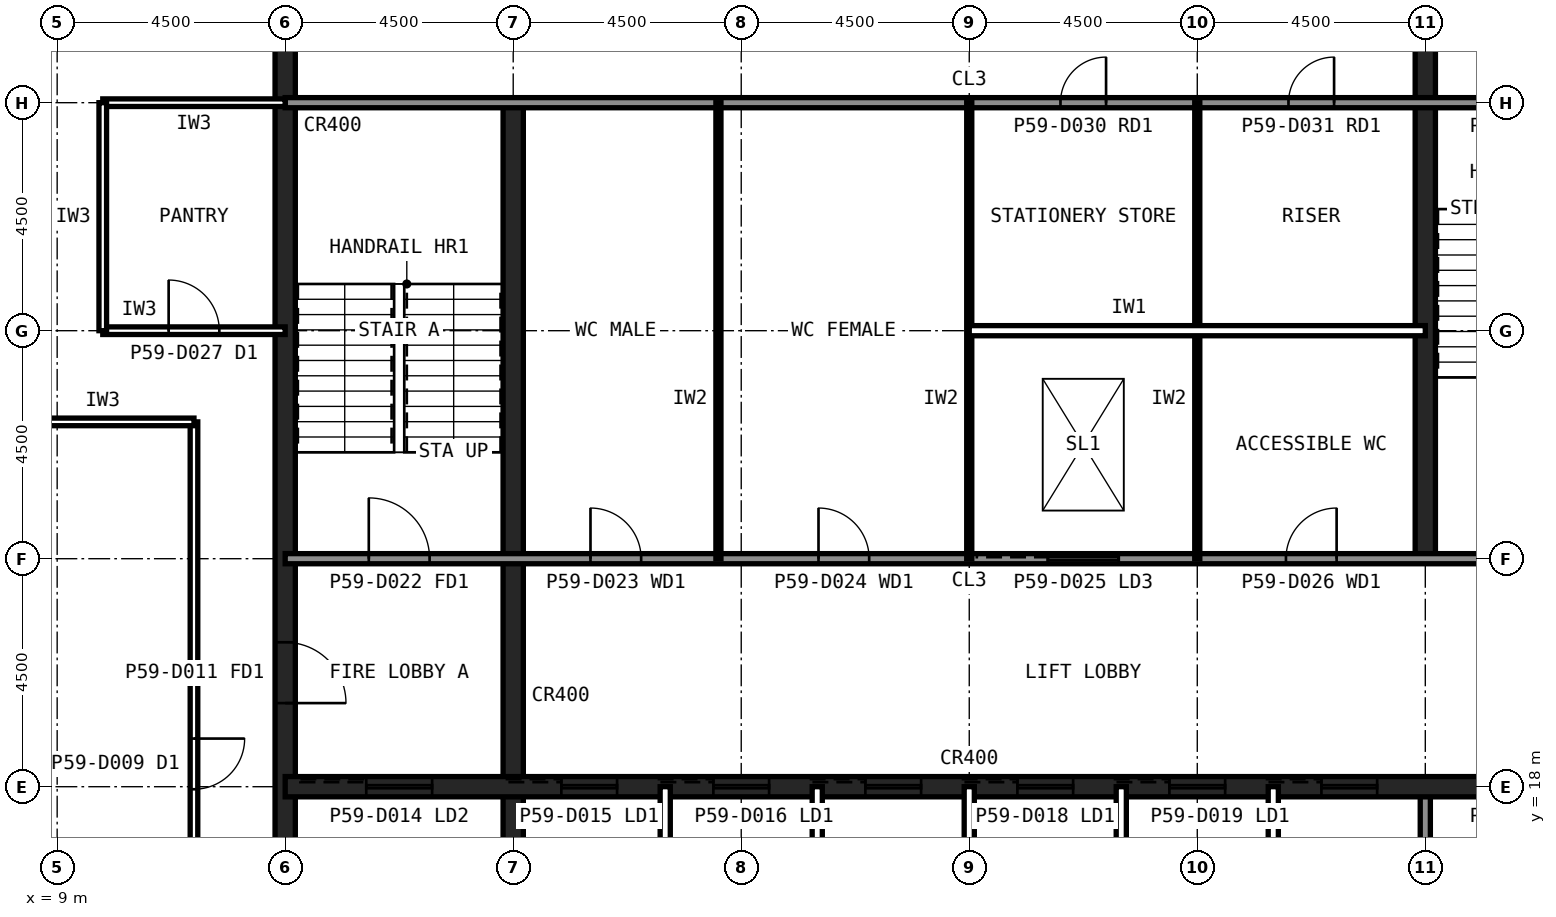
"""IFC4 building model, lengths in metres.
Left out: names, types, materials, properties, quantities, classifications, styles, units other than length and angle.
Written with IfcOpenShell. Run it as: python <this file> out.ifc"""

import sys

from ifc_helpers import new_model, si_unit, direction, frame, frame_2d, origin, place, context, subcontext, project, spatial, rectangle, extrude, element, fill, save


model = new_model("IFC4")
c1 = context("Model", 3, precision=1e-05, world=origin(), true_north=direction((0.0, 1.0)))
c2 = subcontext(c1, "Body", "Model", "MODEL_VIEW")
j1 = project(units=[si_unit("LENGTHUNIT", "METRE"), si_unit("PLANEANGLEUNIT", "RADIAN")], contexts=[c1])
p1 = place(None, origin())
s1 = spatial("IfcSite", under=j1, at=p1, CompositionType="ELEMENT")
p2 = place(p1, origin())
s2 = spatial("IfcBuilding", under=s1, at=p2, CompositionType="ELEMENT")
p3 = place(p2, frame((0.0, 0.0, 246.6)))
s3 = spatial("IfcBuildingStorey", under=s2, at=p3, CompositionType="ELEMENT", Elevation=246.6)
p4 = place(p3, frame((13.5, 40.5, 0.0), z_axis=(0.0, 0.0, 1.0), x_axis=(0.0, -1.0, 0.0)))
e1 = element("IfcWall", 1, at=p4, inside=s3, PredefinedType="SHEAR", context=c2, shape_type="SweptSolid", body=[
    extrude(rectangle(XDim=27.0, YDim=0.4, at=frame_2d((13.5, 0.0))), origin(), (0.0, 0.0, 1.0), 4.0),
])
p5 = place(p4, frame((19.65, 0.0, 0.0)))
e2 = element("IfcOpeningElement", 2, at=p5, cuts=e1, PredefinedType="OPENING", context=c2, shape_type="SweptSolid", body=[
    extrude(rectangle(XDim=1.2, YDim=2.1, at=frame_2d((0.6, 1.05))), frame((0.0, 0.21, 0.0), z_axis=(0.0, -1.0, 0.0), x_axis=(1.0, 0.0, 0.0)), (0.0, 0.0, 1.0), 0.42),
])
p6 = place(p4, frame((5.85, 0.0, 0.0)))
e3 = element("IfcOpeningElement", 3, at=p6, cuts=e1, PredefinedType="OPENING", context=c2, shape_type="SweptSolid", body=[
    extrude(rectangle(XDim=1.8, YDim=2.1, at=frame_2d((0.9, 1.05))), frame((0.0, 0.21, 0.0), z_axis=(0.0, -1.0, 0.0), x_axis=(1.0, 0.0, 0.0)), (0.0, 0.0, 1.0), 0.42),
])
p7 = place(p3, frame((18.0, 13.5, 0.0), z_axis=(0.0, 0.0, 1.0), x_axis=(0.0, 1.0, 0.0)))
e4 = element("IfcWall", 4, at=p7, inside=s3, PredefinedType="SHEAR", context=c2, shape_type="SweptSolid", body=[
    extrude(rectangle(XDim=18.0, YDim=0.4, at=frame_2d((9.0, 0.0))), origin(), (0.0, 0.0, 1.0), 4.0),
])
p8 = place(p3, frame((36.0, 13.5, 0.0), z_axis=(0.0, 0.0, 1.0), x_axis=(0.0, 1.0, 0.0)))
e5 = element("IfcWall", 5, at=p8, inside=s3, PredefinedType="SOLIDWALL", context=c2, shape_type="SweptSolid", body=[
    extrude(rectangle(XDim=4.5, YDim=0.2, at=frame_2d((2.25, 0.0))), origin(), (0.0, 0.0, 1.0), 3.84),
])
p9 = place(p3, frame((36.0, 22.5, 0.0), z_axis=(0.0, 0.0, 1.0), x_axis=(0.0, 1.0, 0.0)))
e6 = element("IfcWall", 6, at=p9, inside=s3, PredefinedType="SHEAR", context=c2, shape_type="SweptSolid", body=[
    extrude(rectangle(XDim=18.0, YDim=0.4, at=frame_2d((9.0, 0.0))), origin(), (0.0, 0.0, 1.0), 4.0),
])
p10 = place(p3, frame((13.5, 18.0, 0.0), z_axis=(0.0, 0.0, 1.0), x_axis=(1.0, 0.0, 0.0)))
e7 = element("IfcWall", 7, at=p10, inside=s3, PredefinedType="SHEAR", context=c2, shape_type="SweptSolid", body=[
    extrude(rectangle(XDim=27.0, YDim=0.4, at=frame_2d((13.5, 0.0))), origin(), (0.0, 0.0, 1.0), 4.0),
])
p11 = place(p10, frame((24.3, 0.0, 0.0)))
e8 = element("IfcOpeningElement", 8, at=p11, cuts=e7, PredefinedType="OPENING", context=c2, shape_type="SweptSolid", body=[
    extrude(rectangle(XDim=0.9, YDim=2.1, at=frame_2d((0.45, 1.05))), frame((0.0, 0.21, 0.0), z_axis=(0.0, -1.0, 0.0), x_axis=(1.0, 0.0, 0.0)), (0.0, 0.0, 1.0), 0.42),
])
p12 = place(p10, frame((5.45, 0.0, 0.0)))
e9 = element("IfcOpeningElement", 9, at=p12, cuts=e7, PredefinedType="OPENING", context=c2, shape_type="SweptSolid", body=[
    extrude(rectangle(XDim=1.1, YDim=2.1, at=frame_2d((0.55, 1.05))), frame((0.0, 0.21, 0.0), z_axis=(0.0, -1.0, 0.0), x_axis=(1.0, 0.0, 0.0)), (0.0, 0.0, 1.0), 0.42),
])
p13 = place(p10, frame((8.45, 0.0, 0.0)))
e10 = element("IfcOpeningElement", 10, at=p13, cuts=e7, PredefinedType="OPENING", context=c2, shape_type="SweptSolid", body=[
    extrude(rectangle(XDim=1.1, YDim=2.1, at=frame_2d((0.55, 1.05))), frame((0.0, 0.21, 0.0), z_axis=(0.0, -1.0, 0.0), x_axis=(1.0, 0.0, 0.0)), (0.0, 0.0, 1.0), 0.42),
])
p14 = place(p10, frame((11.45, 0.0, 0.0)))
e11 = element("IfcOpeningElement", 11, at=p14, cuts=e7, PredefinedType="OPENING", context=c2, shape_type="SweptSolid", body=[
    extrude(rectangle(XDim=1.1, YDim=2.1, at=frame_2d((0.55, 1.05))), frame((0.0, 0.21, 0.0), z_axis=(0.0, -1.0, 0.0), x_axis=(1.0, 0.0, 0.0)), (0.0, 0.0, 1.0), 0.42),
])
p15 = place(p10, frame((14.45, 0.0, 0.0)))
e12 = element("IfcOpeningElement", 12, at=p15, cuts=e7, PredefinedType="OPENING", context=c2, shape_type="SweptSolid", body=[
    extrude(rectangle(XDim=1.1, YDim=2.1, at=frame_2d((0.55, 1.05))), frame((0.0, 0.21, 0.0), z_axis=(0.0, -1.0, 0.0), x_axis=(1.0, 0.0, 0.0)), (0.0, 0.0, 1.0), 0.42),
])
p16 = place(p10, frame((17.45, 0.0, 0.0)))
e13 = element("IfcOpeningElement", 13, at=p16, cuts=e7, PredefinedType="OPENING", context=c2, shape_type="SweptSolid", body=[
    extrude(rectangle(XDim=1.1, YDim=2.1, at=frame_2d((0.55, 1.05))), frame((0.0, 0.21, 0.0), z_axis=(0.0, -1.0, 0.0), x_axis=(1.0, 0.0, 0.0)), (0.0, 0.0, 1.0), 0.42),
])
p17 = place(p10, frame((20.45, 0.0, 0.0)))
e14 = element("IfcOpeningElement", 14, at=p17, cuts=e7, PredefinedType="OPENING", context=c2, shape_type="SweptSolid", body=[
    extrude(rectangle(XDim=1.1, YDim=2.1, at=frame_2d((0.55, 1.05))), frame((0.0, 0.21, 0.0), z_axis=(0.0, -1.0, 0.0), x_axis=(1.0, 0.0, 0.0)), (0.0, 0.0, 1.0), 0.42),
])
p18 = place(p10, frame((1.6, 0.0, 0.0)))
e15 = element("IfcOpeningElement", 15, at=p18, cuts=e7, PredefinedType="OPENING", context=c2, shape_type="SweptSolid", body=[
    extrude(rectangle(XDim=1.3, YDim=2.2, at=frame_2d((0.65, 1.1))), frame((0.0, 0.21, 0.0), z_axis=(0.0, -1.0, 0.0), x_axis=(1.0, 0.0, 0.0)), (0.0, 0.0, 1.0), 0.42),
])
p19 = place(p3, frame((13.5, 22.5, 0.0), z_axis=(0.0, 0.0, 1.0), x_axis=(1.0, 0.0, 0.0)))
e16 = element("IfcWall", 16, at=p19, inside=s3, PredefinedType="SOLIDWALL", context=c2, shape_type="SweptSolid", body=[
    extrude(rectangle(XDim=27.0, YDim=0.2, at=frame_2d((13.5, 0.0))), origin(), (0.0, 0.0, 1.0), 3.84),
])
p20 = place(p19, frame((1.65, 0.0, 0.0)))
e17 = element("IfcOpeningElement", 17, at=p20, cuts=e16, PredefinedType="OPENING", context=c2, shape_type="SweptSolid", body=[
    extrude(rectangle(XDim=1.2, YDim=2.1, at=frame_2d((0.6, 1.05))), frame((0.0, 0.11, 0.0), z_axis=(0.0, -1.0, 0.0), x_axis=(1.0, 0.0, 0.0)), (0.0, 0.0, 1.0), 0.22),
])
p21 = place(p19, frame((6.025, 0.0, 0.0)))
e18 = element("IfcOpeningElement", 18, at=p21, cuts=e16, PredefinedType="OPENING", context=c2, shape_type="SweptSolid", body=[
    extrude(rectangle(XDim=1.0, YDim=2.1, at=frame_2d((0.5, 1.05))), frame((0.0, 0.11, 0.0), z_axis=(0.0, -1.0, 0.0), x_axis=(1.0, 0.0, 0.0)), (0.0, 0.0, 1.0), 0.22),
])
p22 = place(p19, frame((10.525, 0.0, 0.0)))
e19 = element("IfcOpeningElement", 19, at=p22, cuts=e16, PredefinedType="OPENING", context=c2, shape_type="SweptSolid", body=[
    extrude(rectangle(XDim=1.0, YDim=2.1, at=frame_2d((0.5, 1.05))), frame((0.0, 0.11, 0.0), z_axis=(0.0, -1.0, 0.0), x_axis=(1.0, 0.0, 0.0)), (0.0, 0.0, 1.0), 0.22),
])
p23 = place(p19, frame((19.75, 0.0, 0.0)))
e20 = element("IfcOpeningElement", 20, at=p23, cuts=e16, PredefinedType="OPENING", context=c2, shape_type="SweptSolid", body=[
    extrude(rectangle(XDim=1.0, YDim=2.1, at=frame_2d((0.5, 1.05))), frame((0.0, 0.11, 0.0), z_axis=(0.0, -1.0, 0.0), x_axis=(1.0, 0.0, 0.0)), (0.0, 0.0, 1.0), 0.22),
])
p24 = place(p19, frame((15.05, 0.0, 0.0)))
e21 = element("IfcOpeningElement", 21, at=p24, cuts=e16, PredefinedType="OPENING", context=c2, shape_type="SweptSolid", body=[
    extrude(rectangle(XDim=1.4, YDim=2.4, at=frame_2d((0.7, 1.2))), frame((0.0, 0.11, 0.0), z_axis=(0.0, -1.0, 0.0), x_axis=(1.0, 0.0, 0.0)), (0.0, 0.0, 1.0), 0.22),
])
p25 = place(p3, frame((13.5, 31.5, 0.0), z_axis=(0.0, 0.0, 1.0), x_axis=(1.0, 0.0, 0.0)))
e22 = element("IfcWall", 22, at=p25, inside=s3, PredefinedType="SOLIDWALL", context=c2, shape_type="SweptSolid", body=[
    extrude(rectangle(XDim=27.0, YDim=0.2, at=frame_2d((13.5, 0.0))), origin(), (0.0, 0.0, 1.0), 3.84),
])
p26 = place(p25, frame((24.15, 0.0, 0.0)))
e23 = element("IfcOpeningElement", 23, at=p26, cuts=e22, PredefinedType="OPENING", context=c2, shape_type="SweptSolid", body=[
    extrude(rectangle(XDim=1.2, YDim=2.1, at=frame_2d((0.6, 1.05))), frame((0.0, 0.11, 0.0), z_axis=(0.0, -1.0, 0.0), x_axis=(1.0, 0.0, 0.0)), (0.0, 0.0, 1.0), 0.22),
])
p27 = place(p25, frame((15.3, 0.0, 0.0)))
e24 = element("IfcOpeningElement", 24, at=p27, cuts=e22, PredefinedType="OPENING", context=c2, shape_type="SweptSolid", body=[
    extrude(rectangle(XDim=0.9, YDim=2.1, at=frame_2d((0.45, 1.05))), frame((0.0, 0.11, 0.0), z_axis=(0.0, -1.0, 0.0), x_axis=(1.0, 0.0, 0.0)), (0.0, 0.0, 1.0), 0.22),
])
p28 = place(p25, frame((19.8, 0.0, 0.0)))
e25 = element("IfcOpeningElement", 25, at=p28, cuts=e22, PredefinedType="OPENING", context=c2, shape_type="SweptSolid", body=[
    extrude(rectangle(XDim=0.9, YDim=2.1, at=frame_2d((0.45, 1.05))), frame((0.0, 0.11, 0.0), z_axis=(0.0, -1.0, 0.0), x_axis=(1.0, 0.0, 0.0)), (0.0, 0.0, 1.0), 0.22),
])
for number, where, z_axis, x_axis in (
    (26, (21.0, 13.5, 0.0), (0.0, 0.0, 1.0), (0.0, 1.0, 0.0)),
    (27, (24.0, 13.5, 0.0), (0.0, 0.0, 1.0), (0.0, 1.0, 0.0)),
    (28, (27.0, 13.5, 0.0), (0.0, 0.0, 1.0), (0.0, 1.0, 0.0)),
    (29, (30.0, 13.5, 0.0), (0.0, 0.0, 1.0), (0.0, 1.0, 0.0)),
    (30, (33.0, 13.5, 0.0), (0.0, 0.0, 1.0), (0.0, 1.0, 0.0)),
):
    element("IfcWall", number, at=place(p3, frame(where, z_axis=z_axis, x_axis=x_axis)), inside=s3, PredefinedType="PARTITIONING", context=c2, shape_type="SweptSolid", body=[
        extrude(rectangle(XDim=4.5, YDim=0.2, at=frame_2d((2.25, 0.0))), origin(), (0.0, 0.0, 1.0), 3.84),
    ])
for number, where, z_axis, x_axis in (
    (31, (22.05, 22.5, 0.0), (0.0, 0.0, 1.0), (0.0, 1.0, 0.0)),
    (32, (27.0, 22.5, 0.0), (0.0, 0.0, 1.0), (0.0, 1.0, 0.0)),
    (33, (31.5, 22.5, 0.0), (0.0, 0.0, 1.0), (0.0, 1.0, 0.0)),
):
    element("IfcWall", number, at=place(p3, frame(where, z_axis=z_axis, x_axis=x_axis)), inside=s3, PredefinedType="PLUMBINGWALL", context=c2, shape_type="SweptSolid", body=[
        extrude(rectangle(XDim=9.0, YDim=0.1, at=frame_2d((4.5, 0.0))), origin(), (0.0, 0.0, 1.0), 3.84),
    ])
p29 = place(p3, frame((27.0, 27.0, 0.0), z_axis=(0.0, 0.0, 1.0), x_axis=(1.0, 0.0, 0.0)))
e34 = element("IfcWall", 34, at=p29, inside=s3, PredefinedType="PARTITIONING", context=c2, shape_type="SweptSolid", body=[
    extrude(rectangle(XDim=9.0, YDim=0.2, at=frame_2d((4.5, 0.0))), origin(), (0.0, 0.0, 1.0), 3.84),
])
p30 = place(p3, frame((11.7, 25.2, 0.0), z_axis=(0.0, 0.0, 1.0), x_axis=(0.0, -1.0, 0.0)))
e35 = element("IfcWall", 35, at=p30, inside=s3, PredefinedType="PARTITIONING", context=c2, shape_type="SweptSolid", body=[
    extrude(rectangle(XDim=13.5, YDim=0.15, at=frame_2d((6.75, 0.0))), origin(), (0.0, 0.0, 1.0), 3.84),
])
p31 = place(p30, frame((6.25, 0.0, 0.0)))
e36 = element("IfcOpeningElement", 36, at=p31, cuts=e35, PredefinedType="OPENING", context=c2, shape_type="SweptSolid", body=[
    extrude(rectangle(XDim=1.0, YDim=2.1, at=frame_2d((0.5, 1.05))), frame((0.0, 0.085, 0.0), z_axis=(0.0, -1.0, 0.0), x_axis=(1.0, 0.0, 0.0)), (0.0, 0.0, 1.0), 0.17),
])
p32 = place(p3, frame((8.1, 25.2, 0.0), z_axis=(0.0, 0.0, 1.0), x_axis=(1.0, 0.0, 0.0)))
e37 = element("IfcWall", 37, at=p32, inside=s3, PredefinedType="PARTITIONING", context=c2, shape_type="SweptSolid", body=[
    extrude(rectangle(XDim=3.6, YDim=0.15, at=frame_2d((1.8, 0.0))), origin(), (0.0, 0.0, 1.0), 3.84),
])
p33 = place(p3, frame((9.9, 27.0, 0.0), z_axis=(0.0, 0.0, 1.0), x_axis=(1.0, 0.0, 0.0)))
e38 = element("IfcWall", 38, at=p33, inside=s3, PredefinedType="PARTITIONING", context=c2, shape_type="SweptSolid", body=[
    extrude(rectangle(XDim=3.6, YDim=0.15, at=frame_2d((1.8, 0.0))), origin(), (0.0, 0.0, 1.0), 2.989),
])
p34 = place(p33, frame((1.3, 0.0, 0.0)))
e39 = element("IfcOpeningElement", 39, at=p34, cuts=e38, PredefinedType="OPENING", context=c2, shape_type="SweptSolid", body=[
    extrude(rectangle(XDim=1.0, YDim=2.1, at=frame_2d((0.5, 1.05))), frame((0.0, 0.085, 0.0), z_axis=(0.0, -1.0, 0.0), x_axis=(1.0, 0.0, 0.0)), (0.0, 0.0, 1.0), 0.17),
])
p35 = place(p3, frame((13.5, 31.5, 0.0), z_axis=(0.0, 0.0, 1.0), x_axis=(-1.0, 0.0, 0.0)))
e40 = element("IfcWall", 40, at=p35, inside=s3, PredefinedType="PARTITIONING", context=c2, shape_type="SweptSolid", body=[
    extrude(rectangle(XDim=3.6, YDim=0.15, at=frame_2d((1.8, 0.0))), origin(), (0.0, 0.0, 1.0), 2.989),
])
p36 = place(p3, frame((9.9, 31.5, 0.0), z_axis=(0.0, 0.0, 1.0), x_axis=(0.0, -1.0, 0.0)))
e41 = element("IfcWall", 41, at=p36, inside=s3, PredefinedType="PARTITIONING", context=c2, shape_type="SweptSolid", body=[
    extrude(rectangle(XDim=4.5, YDim=0.15, at=frame_2d((2.25, 0.0))), origin(), (0.0, 0.0, 1.0), 3.84),
])
p37 = place(p5, origin())
e42 = element("IfcDoor", 42, at=p37, inside=s3, OperationType="SINGLE_SWING_RIGHT", PredefinedType="DOOR", context=c2, shape_type="SweptSolid", body=[
    extrude(rectangle(XDim=1.2, YDim=2.1, at=frame_2d((0.6, 1.05))), frame((0.0, 0.025, 0.0), z_axis=(0.0, -1.0, 0.0), x_axis=(1.0, 0.0, 0.0)), (0.0, 0.0, 1.0), 0.05),
])
fill(e2, e42)
p38 = place(p20, origin())
e43 = element("IfcDoor", 43, at=p38, inside=s3, OperationType="SINGLE_SWING_LEFT", PredefinedType="DOOR", context=c2, shape_type="SweptSolid", body=[
    extrude(rectangle(XDim=1.2, YDim=2.1, at=frame_2d((0.6, 1.05))), frame((0.0, 0.025, 0.0), z_axis=(0.0, -1.0, 0.0), x_axis=(1.0, 0.0, 0.0)), (0.0, 0.0, 1.0), 0.05),
])
fill(e17, e43)
p39 = place(p21, origin())
e44 = element("IfcDoor", 44, at=p39, inside=s3, OperationType="SINGLE_SWING_LEFT", PredefinedType="DOOR", context=c2, shape_type="SweptSolid", body=[
    extrude(rectangle(XDim=1.0, YDim=2.1, at=frame_2d((0.5, 1.05))), frame((0.0, 0.025, 0.0), z_axis=(0.0, -1.0, 0.0), x_axis=(1.0, 0.0, 0.0)), (0.0, 0.0, 1.0), 0.05),
])
fill(e18, e44)
p40 = place(p22, origin())
e45 = element("IfcDoor", 45, at=p40, inside=s3, OperationType="SINGLE_SWING_LEFT", PredefinedType="DOOR", context=c2, shape_type="SweptSolid", body=[
    extrude(rectangle(XDim=1.0, YDim=2.1, at=frame_2d((0.5, 1.05))), frame((0.0, 0.025, 0.0), z_axis=(0.0, -1.0, 0.0), x_axis=(1.0, 0.0, 0.0)), (0.0, 0.0, 1.0), 0.05),
])
fill(e19, e45)
p41 = place(p23, origin())
e46 = element("IfcDoor", 46, at=p41, inside=s3, OperationType="SINGLE_SWING_RIGHT", PredefinedType="DOOR", context=c2, shape_type="SweptSolid", body=[
    extrude(rectangle(XDim=1.0, YDim=2.1, at=frame_2d((0.5, 1.05))), frame((0.0, 0.025, 0.0), z_axis=(0.0, -1.0, 0.0), x_axis=(1.0, 0.0, 0.0)), (0.0, 0.0, 1.0), 0.05),
])
fill(e20, e46)
p42 = place(p27, origin())
e47 = element("IfcDoor", 47, at=p42, inside=s3, OperationType="SINGLE_SWING_RIGHT", PredefinedType="DOOR", context=c2, shape_type="SweptSolid", body=[
    extrude(rectangle(XDim=0.9, YDim=2.1, at=frame_2d((0.45, 1.05))), frame((0.0, 0.025, 0.0), z_axis=(0.0, -1.0, 0.0), x_axis=(1.0, 0.0, 0.0)), (0.0, 0.0, 1.0), 0.05),
])
fill(e24, e47)
p43 = place(p28, origin())
e48 = element("IfcDoor", 48, at=p43, inside=s3, OperationType="SINGLE_SWING_RIGHT", PredefinedType="DOOR", context=c2, shape_type="SweptSolid", body=[
    extrude(rectangle(XDim=0.9, YDim=2.1, at=frame_2d((0.45, 1.05))), frame((0.0, 0.025, 0.0), z_axis=(0.0, -1.0, 0.0), x_axis=(1.0, 0.0, 0.0)), (0.0, 0.0, 1.0), 0.05),
])
fill(e25, e48)
p44 = place(p12, origin())
e49 = element("IfcDoor", 49, at=p44, inside=s3, OperationType="SLIDING_TO_LEFT", PredefinedType="DOOR", context=c2, shape_type="SweptSolid", body=[
    extrude(rectangle(XDim=1.1, YDim=2.1, at=frame_2d((0.55, 1.05))), frame((0.0, 0.025, 0.0), z_axis=(0.0, -1.0, 0.0), x_axis=(1.0, 0.0, 0.0)), (0.0, 0.0, 1.0), 0.05),
])
fill(e9, e49)
p45 = place(p13, origin())
e50 = element("IfcDoor", 50, at=p45, inside=s3, OperationType="SLIDING_TO_LEFT", PredefinedType="DOOR", context=c2, shape_type="SweptSolid", body=[
    extrude(rectangle(XDim=1.1, YDim=2.1, at=frame_2d((0.55, 1.05))), frame((0.0, 0.025, 0.0), z_axis=(0.0, -1.0, 0.0), x_axis=(1.0, 0.0, 0.0)), (0.0, 0.0, 1.0), 0.05),
])
fill(e10, e50)
p46 = place(p14, origin())
e51 = element("IfcDoor", 51, at=p46, inside=s3, OperationType="SLIDING_TO_LEFT", PredefinedType="DOOR", context=c2, shape_type="SweptSolid", body=[
    extrude(rectangle(XDim=1.1, YDim=2.1, at=frame_2d((0.55, 1.05))), frame((0.0, 0.025, 0.0), z_axis=(0.0, -1.0, 0.0), x_axis=(1.0, 0.0, 0.0)), (0.0, 0.0, 1.0), 0.05),
])
fill(e11, e51)
p47 = place(p15, origin())
e52 = element("IfcDoor", 52, at=p47, inside=s3, OperationType="SLIDING_TO_LEFT", PredefinedType="DOOR", context=c2, shape_type="SweptSolid", body=[
    extrude(rectangle(XDim=1.1, YDim=2.1, at=frame_2d((0.55, 1.05))), frame((0.0, 0.025, 0.0), z_axis=(0.0, -1.0, 0.0), x_axis=(1.0, 0.0, 0.0)), (0.0, 0.0, 1.0), 0.05),
])
fill(e12, e52)
p48 = place(p16, origin())
e53 = element("IfcDoor", 53, at=p48, inside=s3, OperationType="SLIDING_TO_LEFT", PredefinedType="DOOR", context=c2, shape_type="SweptSolid", body=[
    extrude(rectangle(XDim=1.1, YDim=2.1, at=frame_2d((0.55, 1.05))), frame((0.0, 0.025, 0.0), z_axis=(0.0, -1.0, 0.0), x_axis=(1.0, 0.0, 0.0)), (0.0, 0.0, 1.0), 0.05),
])
fill(e13, e53)
p49 = place(p17, origin())
e54 = element("IfcDoor", 54, at=p49, inside=s3, OperationType="SLIDING_TO_LEFT", PredefinedType="DOOR", context=c2, shape_type="SweptSolid", body=[
    extrude(rectangle(XDim=1.1, YDim=2.1, at=frame_2d((0.55, 1.05))), frame((0.0, 0.025, 0.0), z_axis=(0.0, -1.0, 0.0), x_axis=(1.0, 0.0, 0.0)), (0.0, 0.0, 1.0), 0.05),
])
fill(e14, e54)
p50 = place(p18, origin())
e55 = element("IfcDoor", 55, at=p50, inside=s3, OperationType="SLIDING_TO_LEFT", PredefinedType="DOOR", context=c2, shape_type="SweptSolid", body=[
    extrude(rectangle(XDim=1.3, YDim=2.2, at=frame_2d((0.65, 1.1))), frame((0.0, 0.025, 0.0), z_axis=(0.0, -1.0, 0.0), x_axis=(1.0, 0.0, 0.0)), (0.0, 0.0, 1.0), 0.05),
])
fill(e15, e55)
p51 = place(p24, origin())
e56 = element("IfcDoor", 56, at=p51, inside=s3, OperationType="SLIDING_TO_LEFT", PredefinedType="DOOR", context=c2, shape_type="SweptSolid", body=[
    extrude(rectangle(XDim=1.4, YDim=2.4, at=frame_2d((0.7, 1.2))), frame((0.0, 0.025, 0.0), z_axis=(0.0, -1.0, 0.0), x_axis=(1.0, 0.0, 0.0)), (0.0, 0.0, 1.0), 0.05),
])
fill(e21, e56)
p52 = place(p31, origin())
e57 = element("IfcDoor", 57, at=p52, inside=s3, OperationType="SINGLE_SWING_LEFT", PredefinedType="DOOR", context=c2, shape_type="SweptSolid", body=[
    extrude(rectangle(XDim=1.0, YDim=2.1, at=frame_2d((0.5, 1.05))), frame((0.0, 0.025, 0.0), z_axis=(0.0, -1.0, 0.0), x_axis=(1.0, 0.0, 0.0)), (0.0, 0.0, 1.0), 0.05),
])
fill(e36, e57)
p53 = place(p34, origin())
e58 = element("IfcDoor", 58, at=p53, inside=s3, OperationType="SINGLE_SWING_LEFT", PredefinedType="DOOR", context=c2, shape_type="SweptSolid", body=[
    extrude(rectangle(XDim=1.0, YDim=2.1, at=frame_2d((0.5, 1.05))), frame((0.0, 0.025, 0.0), z_axis=(0.0, -1.0, 0.0), x_axis=(1.0, 0.0, 0.0)), (0.0, 0.0, 1.0), 0.05),
])
fill(e39, e58)
save(model, sys.argv[1])
